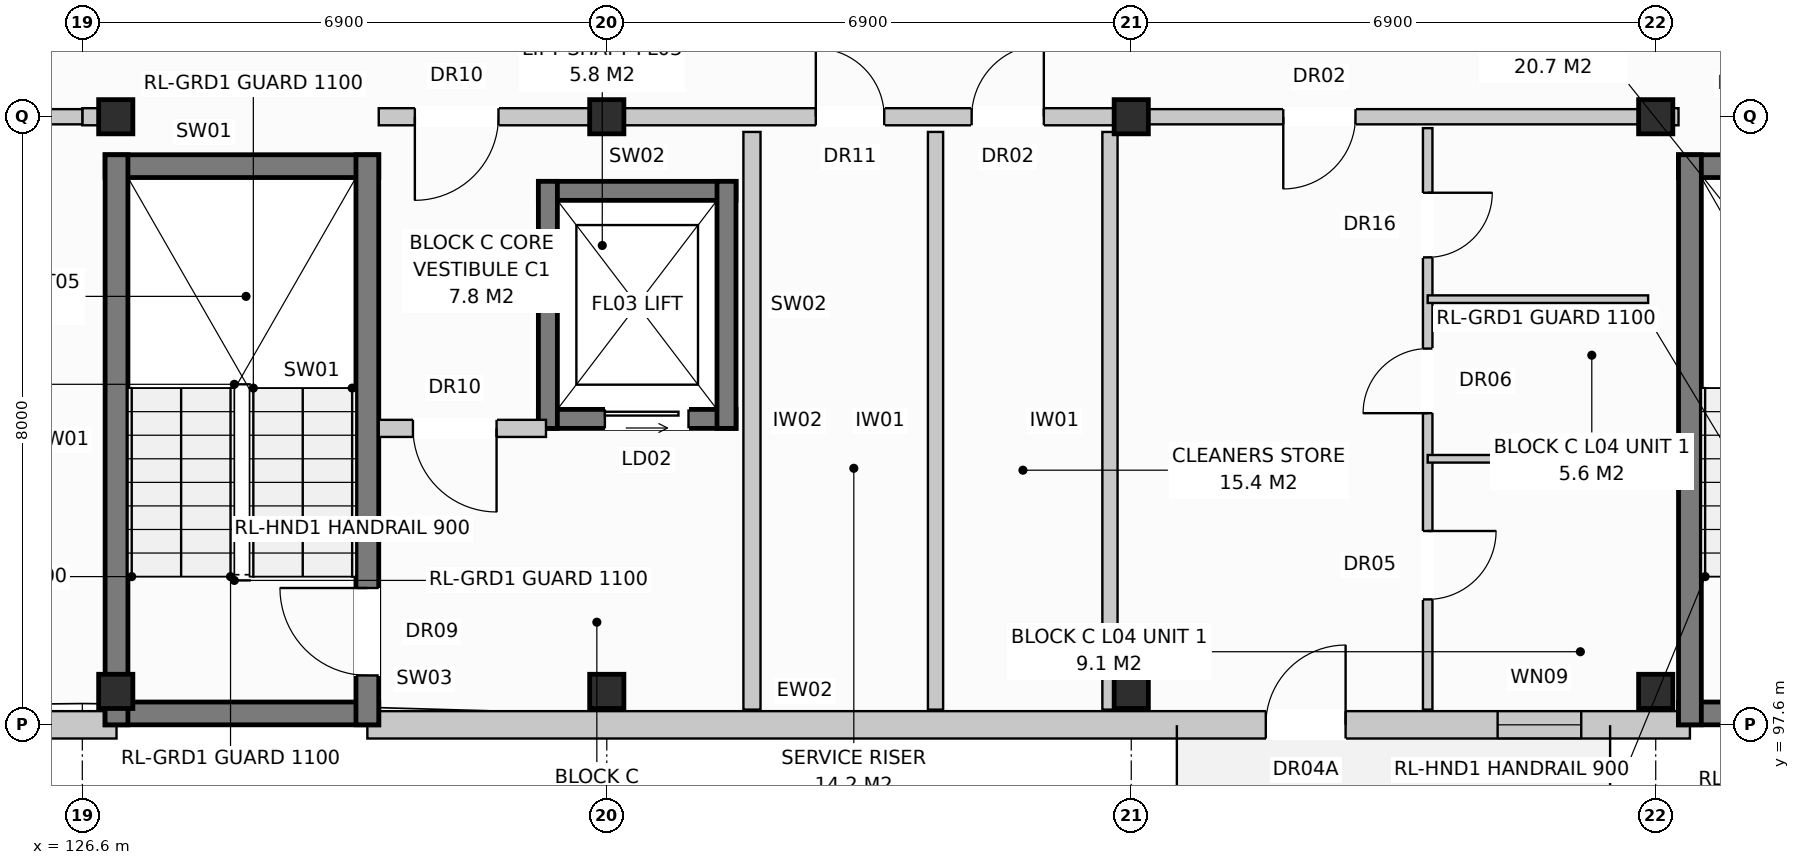
"""IFC4 building model, lengths in metres.
Left out: names, types, materials, properties, quantities, classifications, styles, units other than length and angle.
Written with IfcOpenShell. Run it as: python <this file> out.ifc"""

import sys

from ifc_helpers import new_model, si_unit, direction, frame, frame_2d, origin, origin_with_axes, origin_2d, place, context, subcontext, project, spatial, rectangle, extrude, element, fill, save


model = new_model("IFC4")
c1 = context("Model", 3, precision=1e-05, world=origin(), true_north=direction((0.0, 1.0)))
c2 = subcontext(c1, "Body", "Model", "MODEL_VIEW")
j1 = project(units=[si_unit("LENGTHUNIT", "METRE"), si_unit("PLANEANGLEUNIT", "RADIAN")], contexts=[c1])
p1 = place(None, origin())
s1 = spatial("IfcSite", under=j1, at=p1, CompositionType="ELEMENT")
p2 = place(p1, origin())
s2 = spatial("IfcBuilding", under=s1, at=p2, CompositionType="ELEMENT")
p3 = place(p2, frame((0.0, 0.0, 14.4)))
s3 = spatial("IfcBuildingStorey", under=s2, at=p3, CompositionType="ELEMENT", Elevation=14.4)
for number, where, z_axis, x_axis in (
    (1, (127.04, 98.04, 0.0), (0.0, 0.0, 1.0), (1.0, 0.0, 0.0)),
    (2, (127.04, 105.6, 0.0), (0.0, 0.0, 1.0), (1.0, 0.0, 0.0)),
    (3, (133.5, 98.04, 0.0), (0.0, 0.0, 1.0), (1.0, 0.0, 0.0)),
    (4, (133.5, 105.6, 0.0), (0.0, 0.0, 1.0), (1.0, 0.0, 0.0)),
    (5, (140.4, 98.04, 0.0), (0.0, 0.0, 1.0), (1.0, 0.0, 0.0)),
    (6, (140.4, 105.6, 0.0), (0.0, 0.0, 1.0), (1.0, 0.0, 0.0)),
    (7, (147.3, 98.04, 0.0), (0.0, 0.0, 1.0), (1.0, 0.0, 0.0)),
    (8, (147.3, 105.6, 0.0), (0.0, 0.0, 1.0), (1.0, 0.0, 0.0)),
):
    element("IfcColumn", number, at=place(p3, frame(where, z_axis=z_axis, x_axis=x_axis)), inside=s3, PredefinedType="COLUMN", context=c2, shape_type="SweptSolid", body=[
        extrude(rectangle(XDim=0.45, YDim=0.45, at=origin_2d()), origin(), (0.0, 0.0, 1.0), 3.2),
    ])
p4 = place(p3, frame((112.97, 97.6, 0.0), z_axis=(0.0, 0.0, 1.0), x_axis=(1.0, 0.0, 0.0)))
e9 = element("IfcWall", 9, at=p4, inside=s3, PredefinedType="STANDARD", context=c2, shape_type="SweptSolid", body=[
    extrude(rectangle(XDim=14.08, YDim=0.36, at=frame_2d((7.04, 0.0))), origin(), (0.0, 0.0, 1.0), 2.94),
])
p5 = place(p4, frame((5.05, 0.0, 0.0)))
e10 = element("IfcOpeningElement", 10, at=p5, cuts=e9, PredefinedType="OPENING", context=c2, shape_type="SweptSolid", body=[
    extrude(rectangle(XDim=1.05, YDim=2.12, at=frame_2d((0.525, 1.06))), frame((0.0, 0.192, 0.0), z_axis=(0.0, -1.0, 0.0), x_axis=(1.0, 0.0, 0.0)), (0.0, 0.0, 1.0), 0.384),
])
p6 = place(p4, frame((1.025, 0.0, 0.8)))
e11 = element("IfcOpeningElement", 11, at=p6, cuts=e9, PredefinedType="OPENING", context=c2, shape_type="SweptSolid", body=[
    extrude(rectangle(XDim=1.95, YDim=1.65, at=frame_2d((0.975, 0.825))), frame((0.0, 0.192, 0.0), z_axis=(0.0, -1.0, 0.0), x_axis=(1.0, 0.0, 0.0)), (0.0, 0.0, 1.0), 0.384),
])
p7 = place(p4, frame((7.3, 0.0, 0.9)))
e12 = element("IfcOpeningElement", 12, at=p7, cuts=e9, PredefinedType="OPENING", context=c2, shape_type="SweptSolid", body=[
    extrude(rectangle(XDim=0.95, YDim=1.55, at=frame_2d((0.475, 0.775))), frame((0.0, 0.192, 0.0), z_axis=(0.0, -1.0, 0.0), x_axis=(1.0, 0.0, 0.0)), (0.0, 0.0, 1.0), 0.384),
])
p8 = place(p4, frame((10.05, 0.0, 0.8)))
e13 = element("IfcOpeningElement", 13, at=p8, cuts=e9, PredefinedType="OPENING", context=c2, shape_type="SweptSolid", body=[
    extrude(rectangle(XDim=1.9, YDim=1.85, at=frame_2d((0.95, 0.925))), frame((0.0, 0.192, 0.0), z_axis=(0.0, -1.0, 0.0), x_axis=(1.0, 0.0, 0.0)), (0.0, 0.0, 1.0), 0.384),
])
p9 = place(p3, frame((130.35, 97.6, 0.0), z_axis=(0.0, 0.0, 1.0), x_axis=(1.0, 0.0, 0.0)))
e14 = element("IfcWall", 14, at=p9, inside=s3, PredefinedType="STANDARD", context=c2, shape_type="SweptSolid", body=[
    extrude(rectangle(XDim=17.4, YDim=0.36, at=frame_2d((8.7, 0.0))), origin(), (0.0, 0.0, 1.0), 2.94),
])
p10 = place(p9, frame((11.82, 0.0, 0.0)))
e15 = element("IfcOpeningElement", 15, at=p10, cuts=e14, PredefinedType="OPENING", context=c2, shape_type="SweptSolid", body=[
    extrude(rectangle(XDim=1.05, YDim=2.12, at=frame_2d((0.525, 1.06))), frame((0.0, 0.192, 0.0), z_axis=(0.0, -1.0, 0.0), x_axis=(1.0, 0.0, 0.0)), (0.0, 0.0, 1.0), 0.384),
])
p11 = place(p9, frame((14.87, 0.0, 0.72)))
e16 = element("IfcOpeningElement", 16, at=p11, cuts=e14, PredefinedType="OPENING", context=c2, shape_type="SweptSolid", body=[
    extrude(rectangle(XDim=1.1, YDim=1.5, at=frame_2d((0.55, 0.75))), frame((0.0, 0.192, 0.0), z_axis=(0.0, -1.0, 0.0), x_axis=(1.0, 0.0, 0.0)), (0.0, 0.0, 1.0), 0.384),
])
for number, where, z_axis, x_axis in (
    (17, (126.9, 97.75, 0.0), (0.0, 0.0, 1.0), (1.0, 0.0, 0.0)),
    (18, (126.9, 104.95, 0.0), (0.0, 0.0, 1.0), (1.0, 0.0, 0.0)),
):
    element("IfcWall", number, at=place(p3, frame(where, z_axis=z_axis, x_axis=x_axis)), inside=s3, PredefinedType="SHEAR", context=c2, shape_type="SweptSolid", body=[
        extrude(rectangle(XDim=3.6, YDim=0.3, at=frame_2d((1.8, 0.0))), origin(), (0.0, 0.0, 1.0), 2.94),
    ])
p12 = place(p3, frame((127.05, 97.6, 0.0), z_axis=(0.0, 0.0, 1.0), x_axis=(0.0, 1.0, 0.0)))
e19 = element("IfcWall", 19, at=p12, inside=s3, PredefinedType="SHEAR", context=c2, shape_type="SweptSolid", body=[
    extrude(rectangle(XDim=7.5, YDim=0.3, at=frame_2d((3.75, 0.0))), origin(), (0.0, 0.0, 1.0), 2.94),
])
p13 = place(p3, frame((130.35, 97.6, 0.0), z_axis=(0.0, 0.0, 1.0), x_axis=(0.0, 1.0, 0.0)))
e20 = element("IfcWall", 20, at=p13, inside=s3, PredefinedType="SHEAR", context=c2, shape_type="SweptSolid", body=[
    extrude(rectangle(XDim=7.5, YDim=0.3, at=frame_2d((3.75, 0.0))), origin(), (0.0, 0.0, 1.0), 2.94),
])
p14 = place(p13, frame((0.65, 0.0, 0.0)))
e21 = element("IfcOpeningElement", 21, at=p14, cuts=e20, PredefinedType="OPENING", context=c2, shape_type="SweptSolid", body=[
    extrude(rectangle(XDim=1.15, YDim=2.15, at=frame_2d((0.575, 1.075))), frame((0.0, 0.162, 0.0), z_axis=(0.0, -1.0, 0.0), x_axis=(1.0, 0.0, 0.0)), (0.0, 0.0, 1.0), 0.324),
])
p15 = place(p3, frame((132.6, 101.625, 0.0), z_axis=(0.0, 0.0, 1.0), x_axis=(1.0, 0.0, 0.0)))
e22 = element("IfcWall", 22, at=p15, inside=s3, PredefinedType="SHEAR", context=c2, shape_type="SweptSolid", body=[
    extrude(rectangle(XDim=2.6, YDim=0.25, at=frame_2d((1.3, 0.0))), origin(), (0.0, 0.0, 1.0), 2.94),
])
p16 = place(p15, frame((0.875, 0.0, 0.0)))
e23 = element("IfcOpeningElement", 23, at=p16, cuts=e22, PredefinedType="OPENING", context=c2, shape_type="SweptSolid", body=[
    extrude(rectangle(XDim=1.1, YDim=2.1, at=frame_2d((0.55, 1.05))), frame((0.0, 0.137, 0.0), z_axis=(0.0, -1.0, 0.0), x_axis=(1.0, 0.0, 0.0)), (0.0, 0.0, 1.0), 0.274),
])
p17 = place(p3, frame((132.6, 104.625, 0.0), z_axis=(0.0, 0.0, 1.0), x_axis=(1.0, 0.0, 0.0)))
e24 = element("IfcWall", 24, at=p17, inside=s3, PredefinedType="SHEAR", context=c2, shape_type="SweptSolid", body=[
    extrude(rectangle(XDim=2.6, YDim=0.25, at=frame_2d((1.3, 0.0))), origin(), (0.0, 0.0, 1.0), 2.94),
])
for number, where, z_axis, x_axis in (
    (25, (132.725, 101.5, 0.0), (0.0, 0.0, 1.0), (0.0, 1.0, 0.0)),
    (26, (135.075, 101.5, 0.0), (0.0, 0.0, 1.0), (0.0, 1.0, 0.0)),
):
    element("IfcWall", number, at=place(p3, frame(where, z_axis=z_axis, x_axis=x_axis)), inside=s3, PredefinedType="SHEAR", context=c2, shape_type="SweptSolid", body=[
        extrude(rectangle(XDim=3.25, YDim=0.25, at=frame_2d((1.625, 0.0))), origin(), (0.0, 0.0, 1.0), 2.94),
    ])
p18 = place(p3, frame((135.41, 97.8, 0.0), z_axis=(0.0, 0.0, 1.0), x_axis=(0.0, 1.0, 0.0)))
e27 = element("IfcWall", 27, at=p18, inside=s3, PredefinedType="PARTITIONING", context=c2, shape_type="SweptSolid", body=[
    extrude(rectangle(XDim=7.6, YDim=0.225, at=frame_2d((3.8, 0.0))), origin(), (0.0, 0.0, 1.0), 2.59),
])
p19 = place(p3, frame((130.5, 101.5, 0.0), z_axis=(0.0, 0.0, 1.0), x_axis=(1.0, 0.0, 0.0)))
e28 = element("IfcWall", 28, at=p19, inside=s3, PredefinedType="PARTITIONING", context=c2, shape_type="SweptSolid", body=[
    extrude(rectangle(XDim=2.2, YDim=0.225, at=frame_2d((1.1, 0.0))), origin(), (0.0, 0.0, 1.0), 2.94),
])
p20 = place(p19, frame((0.45, 0.0, 0.0)))
e29 = element("IfcOpeningElement", 29, at=p20, cuts=e28, PredefinedType="OPENING", context=c2, shape_type="SweptSolid", body=[
    extrude(rectangle(XDim=1.1, YDim=2.15, at=frame_2d((0.55, 1.075))), frame((0.0, 0.125, 0.0), z_axis=(0.0, -1.0, 0.0), x_axis=(1.0, 0.0, 0.0)), (0.0, 0.0, 1.0), 0.249),
])
p21 = place(p3, frame((126.6, 105.6, 0.0), z_axis=(0.0, 0.0, 1.0), x_axis=(1.0, 0.0, 0.0)))
e30 = element("IfcWall", 30, at=p21, inside=s3, PredefinedType="PARTITIONING", context=c2, shape_type="SweptSolid", body=[
    extrude(rectangle(XDim=0.3, YDim=0.225, at=frame_2d((0.15, 0.0))), origin(), (0.0, 0.0, 1.0), 2.94),
])
for number, where, z_axis, x_axis in (
    (31, (137.825, 97.8, 0.0), (0.0, 0.0, 1.0), (0.0, 1.0, 0.0)),
    (32, (140.12, 97.8, 0.0), (0.0, 0.0, 1.0), (0.0, 1.0, 0.0)),
):
    element("IfcWall", number, at=place(p3, frame(where, z_axis=z_axis, x_axis=x_axis)), inside=s3, PredefinedType="PARTITIONING", context=c2, shape_type="SweptSolid", body=[
        extrude(rectangle(XDim=7.6, YDim=0.2, at=frame_2d((3.8, 0.0))), origin(), (0.0, 0.0, 1.0), 2.94),
    ])
p22 = place(p3, frame((130.5, 105.6, 0.0), z_axis=(0.0, 0.0, 1.0), x_axis=(1.0, 0.0, 0.0)))
e33 = element("IfcWall", 33, at=p22, inside=s3, PredefinedType="PARTITIONING", context=c2, shape_type="SweptSolid", body=[
    extrude(rectangle(XDim=9.9, YDim=0.225, at=frame_2d((4.95, 0.0))), origin(), (0.0, 0.0, 1.0), 2.38),
])
p23 = place(p22, frame((0.475, 0.0, 0.0)))
e34 = element("IfcOpeningElement", 34, at=p23, cuts=e33, PredefinedType="OPENING", context=c2, shape_type="SweptSolid", body=[
    extrude(rectangle(XDim=1.1, YDim=2.15, at=frame_2d((0.55, 1.075))), frame((0.0, 0.125, 0.0), z_axis=(0.0, -1.0, 0.0), x_axis=(1.0, 0.0, 0.0)), (0.0, 0.0, 1.0), 0.249),
])
p24 = place(p22, frame((5.75, 0.0, 0.0)))
e35 = element("IfcOpeningElement", 35, at=p24, cuts=e33, PredefinedType="OPENING", context=c2, shape_type="SweptSolid", body=[
    extrude(rectangle(XDim=0.9, YDim=2.1, at=frame_2d((0.45, 1.05))), frame((0.0, 0.125, 0.0), z_axis=(0.0, -1.0, 0.0), x_axis=(1.0, 0.0, 0.0)), (0.0, 0.0, 1.0), 0.249),
])
p25 = place(p22, frame((7.8, 0.0, 0.0)))
e36 = element("IfcOpeningElement", 36, at=p25, cuts=e33, PredefinedType="OPENING", context=c2, shape_type="SweptSolid", body=[
    extrude(rectangle(XDim=0.95, YDim=2.15, at=frame_2d((0.475, 1.075))), frame((0.0, 0.125, 0.0), z_axis=(0.0, -1.0, 0.0), x_axis=(1.0, 0.0, 0.0)), (0.0, 0.0, 1.0), 0.249),
])
for number, where, z_axis, x_axis in (
    (37, (147.6, 97.75, 0.0), (0.0, 0.0, 1.0), (1.0, 0.0, 0.0)),
    (38, (147.6, 104.95, 0.0), (0.0, 0.0, 1.0), (1.0, 0.0, 0.0)),
):
    element("IfcWall", number, at=place(p3, frame(where, z_axis=z_axis, x_axis=x_axis)), inside=s3, PredefinedType="SHEAR", context=c2, shape_type="SweptSolid", body=[
        extrude(rectangle(XDim=3.6, YDim=0.3, at=frame_2d((1.8, 0.0))), origin(), (0.0, 0.0, 1.0), 2.94),
    ])
p26 = place(p3, frame((147.75, 97.6, 0.0), z_axis=(0.0, 0.0, 1.0), x_axis=(0.0, 1.0, 0.0)))
e39 = element("IfcWall", 39, at=p26, inside=s3, PredefinedType="SHEAR", context=c2, shape_type="SweptSolid", body=[
    extrude(rectangle(XDim=7.5, YDim=0.3, at=frame_2d((3.75, 0.0))), origin(), (0.0, 0.0, 1.0), 2.94),
])
p27 = place(p3, frame((147.3, 105.6, 0.0), z_axis=(0.0, 0.0, 1.0), x_axis=(1.0, 0.0, 0.0)))
e40 = element("IfcWall", 40, at=p27, inside=s3, PredefinedType="PARTITIONING", context=c2, shape_type="SweptSolid", body=[
    extrude(rectangle(XDim=0.3, YDim=0.225, at=frame_2d((0.15, 0.0))), origin(), (0.0, 0.0, 1.0), 2.94),
])
p28 = place(p3, frame((112.8, 105.6, 0.0), z_axis=(0.0, 0.0, 1.0), x_axis=(1.0, 0.0, 0.0)))
e41 = element("IfcWall", 41, at=p28, inside=s3, PredefinedType="PARTITIONING", context=c2, shape_type="SweptSolid", body=[
    extrude(rectangle(XDim=13.8, YDim=0.2, at=frame_2d((6.9, 0.0))), origin(), (0.0, 0.0, 1.0), 2.38),
])
p29 = place(p28, frame((9.6, 0.0, 0.0)))
e42 = element("IfcOpeningElement", 42, at=p29, cuts=e41, PredefinedType="OPENING", context=c2, shape_type="SweptSolid", body=[
    extrude(rectangle(XDim=0.95, YDim=2.15, at=frame_2d((0.475, 1.075))), frame((0.0, 0.112, 0.0), z_axis=(0.0, -1.0, 0.0), x_axis=(1.0, 0.0, 0.0)), (0.0, 0.0, 1.0), 0.224),
])
p30 = place(p3, frame((140.4, 105.6, 0.0), z_axis=(0.0, 0.0, 1.0), x_axis=(1.0, 0.0, 0.0)))
e43 = element("IfcWall", 43, at=p30, inside=s3, PredefinedType="PARTITIONING", context=c2, shape_type="SweptSolid", body=[
    extrude(rectangle(XDim=6.9, YDim=0.2, at=frame_2d((3.45, 0.0))), origin(), (0.0, 0.0, 1.0), 2.38),
])
p31 = place(p30, frame((2.0, 0.0, 0.0)))
e44 = element("IfcOpeningElement", 44, at=p31, cuts=e43, PredefinedType="OPENING", context=c2, shape_type="SweptSolid", body=[
    extrude(rectangle(XDim=0.95, YDim=2.15, at=frame_2d((0.475, 1.075))), frame((0.0, 0.112, 0.0), z_axis=(0.0, -1.0, 0.0), x_axis=(1.0, 0.0, 0.0)), (0.0, 0.0, 1.0), 0.224),
])
p32 = place(p3, frame((144.3, 105.45, 0.0), z_axis=(0.0, 0.0, 1.0), x_axis=(0.0, -1.0, 0.0)))
e45 = element("IfcWall", 45, at=p32, inside=s3, PredefinedType="PARTITIONING", context=c2, shape_type="SweptSolid", body=[
    extrude(rectangle(XDim=7.65, YDim=0.125, at=frame_2d((3.825, 0.0))), origin(), (0.0, 0.0, 1.0), 2.94),
])
p33 = place(p32, frame((0.85, 0.0, 0.0)))
e46 = element("IfcOpeningElement", 46, at=p33, cuts=e45, PredefinedType="OPENING", context=c2, shape_type="SweptSolid", body=[
    extrude(rectangle(XDim=0.85, YDim=2.1, at=frame_2d((0.425, 1.05))), frame((0.0, 0.074, 0.0), z_axis=(0.0, -1.0, 0.0), x_axis=(1.0, 0.0, 0.0)), (0.0, 0.0, 1.0), 0.149),
])
p34 = place(p32, frame((2.9, 0.0, 0.0)))
e47 = element("IfcOpeningElement", 47, at=p34, cuts=e45, PredefinedType="OPENING", context=c2, shape_type="SweptSolid", body=[
    extrude(rectangle(XDim=0.85, YDim=2.05, at=frame_2d((0.425, 1.025))), frame((0.0, 0.074, 0.0), z_axis=(0.0, -1.0, 0.0), x_axis=(1.0, 0.0, 0.0)), (0.0, 0.0, 1.0), 0.149),
])
p35 = place(p32, frame((5.3, 0.0, 0.0)))
e48 = element("IfcOpeningElement", 48, at=p35, cuts=e45, PredefinedType="OPENING", context=c2, shape_type="SweptSolid", body=[
    extrude(rectangle(XDim=0.9, YDim=2.1, at=frame_2d((0.45, 1.05))), frame((0.0, 0.074, 0.0), z_axis=(0.0, -1.0, 0.0), x_axis=(1.0, 0.0, 0.0)), (0.0, 0.0, 1.0), 0.149),
])
for number, where, z_axis, x_axis in (
    (49, (144.3, 103.2, 0.0), (0.0, 0.0, 1.0), (1.0, 0.0, 0.0)),
    (50, (144.3, 101.1, 0.0), (0.0, 0.0, 1.0), (1.0, 0.0, 0.0)),
):
    element("IfcWall", number, at=place(p3, frame(where, z_axis=z_axis, x_axis=x_axis)), inside=s3, PredefinedType="PARTITIONING", context=c2, shape_type="SweptSolid", body=[
        extrude(rectangle(XDim=2.9, YDim=0.1, at=frame_2d((1.45, 0.0))), origin(), (0.0, 0.0, 1.0), 2.94),
    ])
p36 = place(p10, origin_with_axes())
e51 = element("IfcDoor", 51, at=p36, inside=s3, OperationType="SINGLE_SWING_RIGHT", PredefinedType="DOOR", context=c2, shape_type="SweptSolid", body=[
    extrude(rectangle(XDim=1.05, YDim=2.12, at=frame_2d((0.525, 1.06))), frame((0.0, 0.025, 0.0), z_axis=(0.0, -1.0, 0.0), x_axis=(1.0, 0.0, 0.0)), (0.0, 0.0, 1.0), 0.05),
])
fill(e15, e51)
p37 = place(p11, origin_with_axes())
e52 = element("IfcWindow", 52, at=p37, inside=s3, PartitioningType="SINGLE_PANEL", PredefinedType="WINDOW", context=c2, shape_type="SweptSolid", body=[
    extrude(rectangle(XDim=1.1, YDim=1.5, at=frame_2d((0.55, 0.75))), frame((0.0, 0.03, 0.0), z_axis=(0.0, -1.0, 0.0), x_axis=(1.0, 0.0, 0.0)), (0.0, 0.0, 1.0), 0.06),
])
fill(e16, e52)
p38 = place(p14, origin_with_axes())
e53 = element("IfcDoor", 53, at=p38, inside=s3, OperationType="SINGLE_SWING_RIGHT", PredefinedType="DOOR", context=c2, shape_type="SweptSolid", body=[
    extrude(rectangle(XDim=1.15, YDim=2.15, at=frame_2d((0.575, 1.075))), frame((0.0, 0.025, 0.0), z_axis=(0.0, -1.0, 0.0), x_axis=(1.0, 0.0, 0.0)), (0.0, 0.0, 1.0), 0.05),
])
fill(e21, e53)
p39 = place(p16, origin_with_axes())
e54 = element("IfcDoor", 54, at=p39, inside=s3, OperationType="SLIDING_TO_LEFT", PredefinedType="DOOR", context=c2, shape_type="SweptSolid", body=[
    extrude(rectangle(XDim=1.1, YDim=2.1, at=frame_2d((0.55, 1.05))), frame((0.0, 0.025, 0.0), z_axis=(0.0, -1.0, 0.0), x_axis=(1.0, 0.0, 0.0)), (0.0, 0.0, 1.0), 0.05),
])
fill(e23, e54)
p40 = place(p20, frame((1.1, 0.0, 0.0), z_axis=(0.0, 0.0, 1.0), x_axis=(-1.0, 0.0, 0.0)))
e55 = element("IfcDoor", 55, at=p40, inside=s3, OperationType="SINGLE_SWING_RIGHT", PredefinedType="DOOR", context=c2, shape_type="SweptSolid", body=[
    extrude(rectangle(XDim=1.1, YDim=2.15, at=frame_2d((0.55, 1.075))), frame((0.0, 0.025, 0.0), z_axis=(0.0, -1.0, 0.0), x_axis=(1.0, 0.0, 0.0)), (0.0, 0.0, 1.0), 0.05),
])
fill(e29, e55)
p41 = place(p23, frame((1.1, 0.0, 0.0), z_axis=(0.0, 0.0, 1.0), x_axis=(-1.0, 0.0, 0.0)))
e56 = element("IfcDoor", 56, at=p41, inside=s3, OperationType="SINGLE_SWING_LEFT", PredefinedType="DOOR", context=c2, shape_type="SweptSolid", body=[
    extrude(rectangle(XDim=1.1, YDim=2.15, at=frame_2d((0.55, 1.075))), frame((0.0, 0.025, 0.0), z_axis=(0.0, -1.0, 0.0), x_axis=(1.0, 0.0, 0.0)), (0.0, 0.0, 1.0), 0.05),
])
fill(e34, e56)
p42 = place(p24, origin_with_axes())
e57 = element("IfcDoor", 57, at=p42, inside=s3, OperationType="SINGLE_SWING_LEFT", PredefinedType="DOOR", context=c2, shape_type="SweptSolid", body=[
    extrude(rectangle(XDim=0.9, YDim=2.1, at=frame_2d((0.45, 1.05))), frame((0.0, 0.025, 0.0), z_axis=(0.0, -1.0, 0.0), x_axis=(1.0, 0.0, 0.0)), (0.0, 0.0, 1.0), 0.05),
])
fill(e35, e57)
p43 = place(p25, origin_with_axes())
e58 = element("IfcDoor", 58, at=p43, inside=s3, OperationType="SINGLE_SWING_RIGHT", PredefinedType="DOOR", context=c2, shape_type="SweptSolid", body=[
    extrude(rectangle(XDim=0.95, YDim=2.15, at=frame_2d((0.475, 1.075))), frame((0.0, 0.025, 0.0), z_axis=(0.0, -1.0, 0.0), x_axis=(1.0, 0.0, 0.0)), (0.0, 0.0, 1.0), 0.05),
])
fill(e36, e58)
p44 = place(p31, frame((0.95, 0.0, 0.0), z_axis=(0.0, 0.0, 1.0), x_axis=(-1.0, 0.0, 0.0)))
e59 = element("IfcDoor", 59, at=p44, inside=s3, OperationType="SINGLE_SWING_LEFT", PredefinedType="DOOR", context=c2, shape_type="SweptSolid", body=[
    extrude(rectangle(XDim=0.95, YDim=2.15, at=frame_2d((0.475, 1.075))), frame((0.0, 0.025, 0.0), z_axis=(0.0, -1.0, 0.0), x_axis=(1.0, 0.0, 0.0)), (0.0, 0.0, 1.0), 0.05),
])
fill(e44, e59)
p45 = place(p33, origin_with_axes())
e60 = element("IfcDoor", 60, at=p45, inside=s3, OperationType="SINGLE_SWING_LEFT", PredefinedType="DOOR", context=c2, shape_type="SweptSolid", body=[
    extrude(rectangle(XDim=0.85, YDim=2.1, at=frame_2d((0.425, 1.05))), frame((0.0, 0.025, 0.0), z_axis=(0.0, -1.0, 0.0), x_axis=(1.0, 0.0, 0.0)), (0.0, 0.0, 1.0), 0.05),
])
fill(e46, e60)
p46 = place(p34, frame((0.85, 0.0, 0.0), z_axis=(0.0, 0.0, 1.0), x_axis=(-1.0, 0.0, 0.0)))
e61 = element("IfcDoor", 61, at=p46, inside=s3, OperationType="SINGLE_SWING_RIGHT", PredefinedType="DOOR", context=c2, shape_type="SweptSolid", body=[
    extrude(rectangle(XDim=0.85, YDim=2.05, at=frame_2d((0.425, 1.025))), frame((0.0, 0.025, 0.0), z_axis=(0.0, -1.0, 0.0), x_axis=(1.0, 0.0, 0.0)), (0.0, 0.0, 1.0), 0.05),
])
fill(e47, e61)
p47 = place(p35, origin_with_axes())
e62 = element("IfcDoor", 62, at=p47, inside=s3, OperationType="SINGLE_SWING_LEFT", PredefinedType="DOOR", context=c2, shape_type="SweptSolid", body=[
    extrude(rectangle(XDim=0.9, YDim=2.1, at=frame_2d((0.45, 1.05))), frame((0.0, 0.025, 0.0), z_axis=(0.0, -1.0, 0.0), x_axis=(1.0, 0.0, 0.0)), (0.0, 0.0, 1.0), 0.05),
])
fill(e48, e62)
save(model, sys.argv[1])
